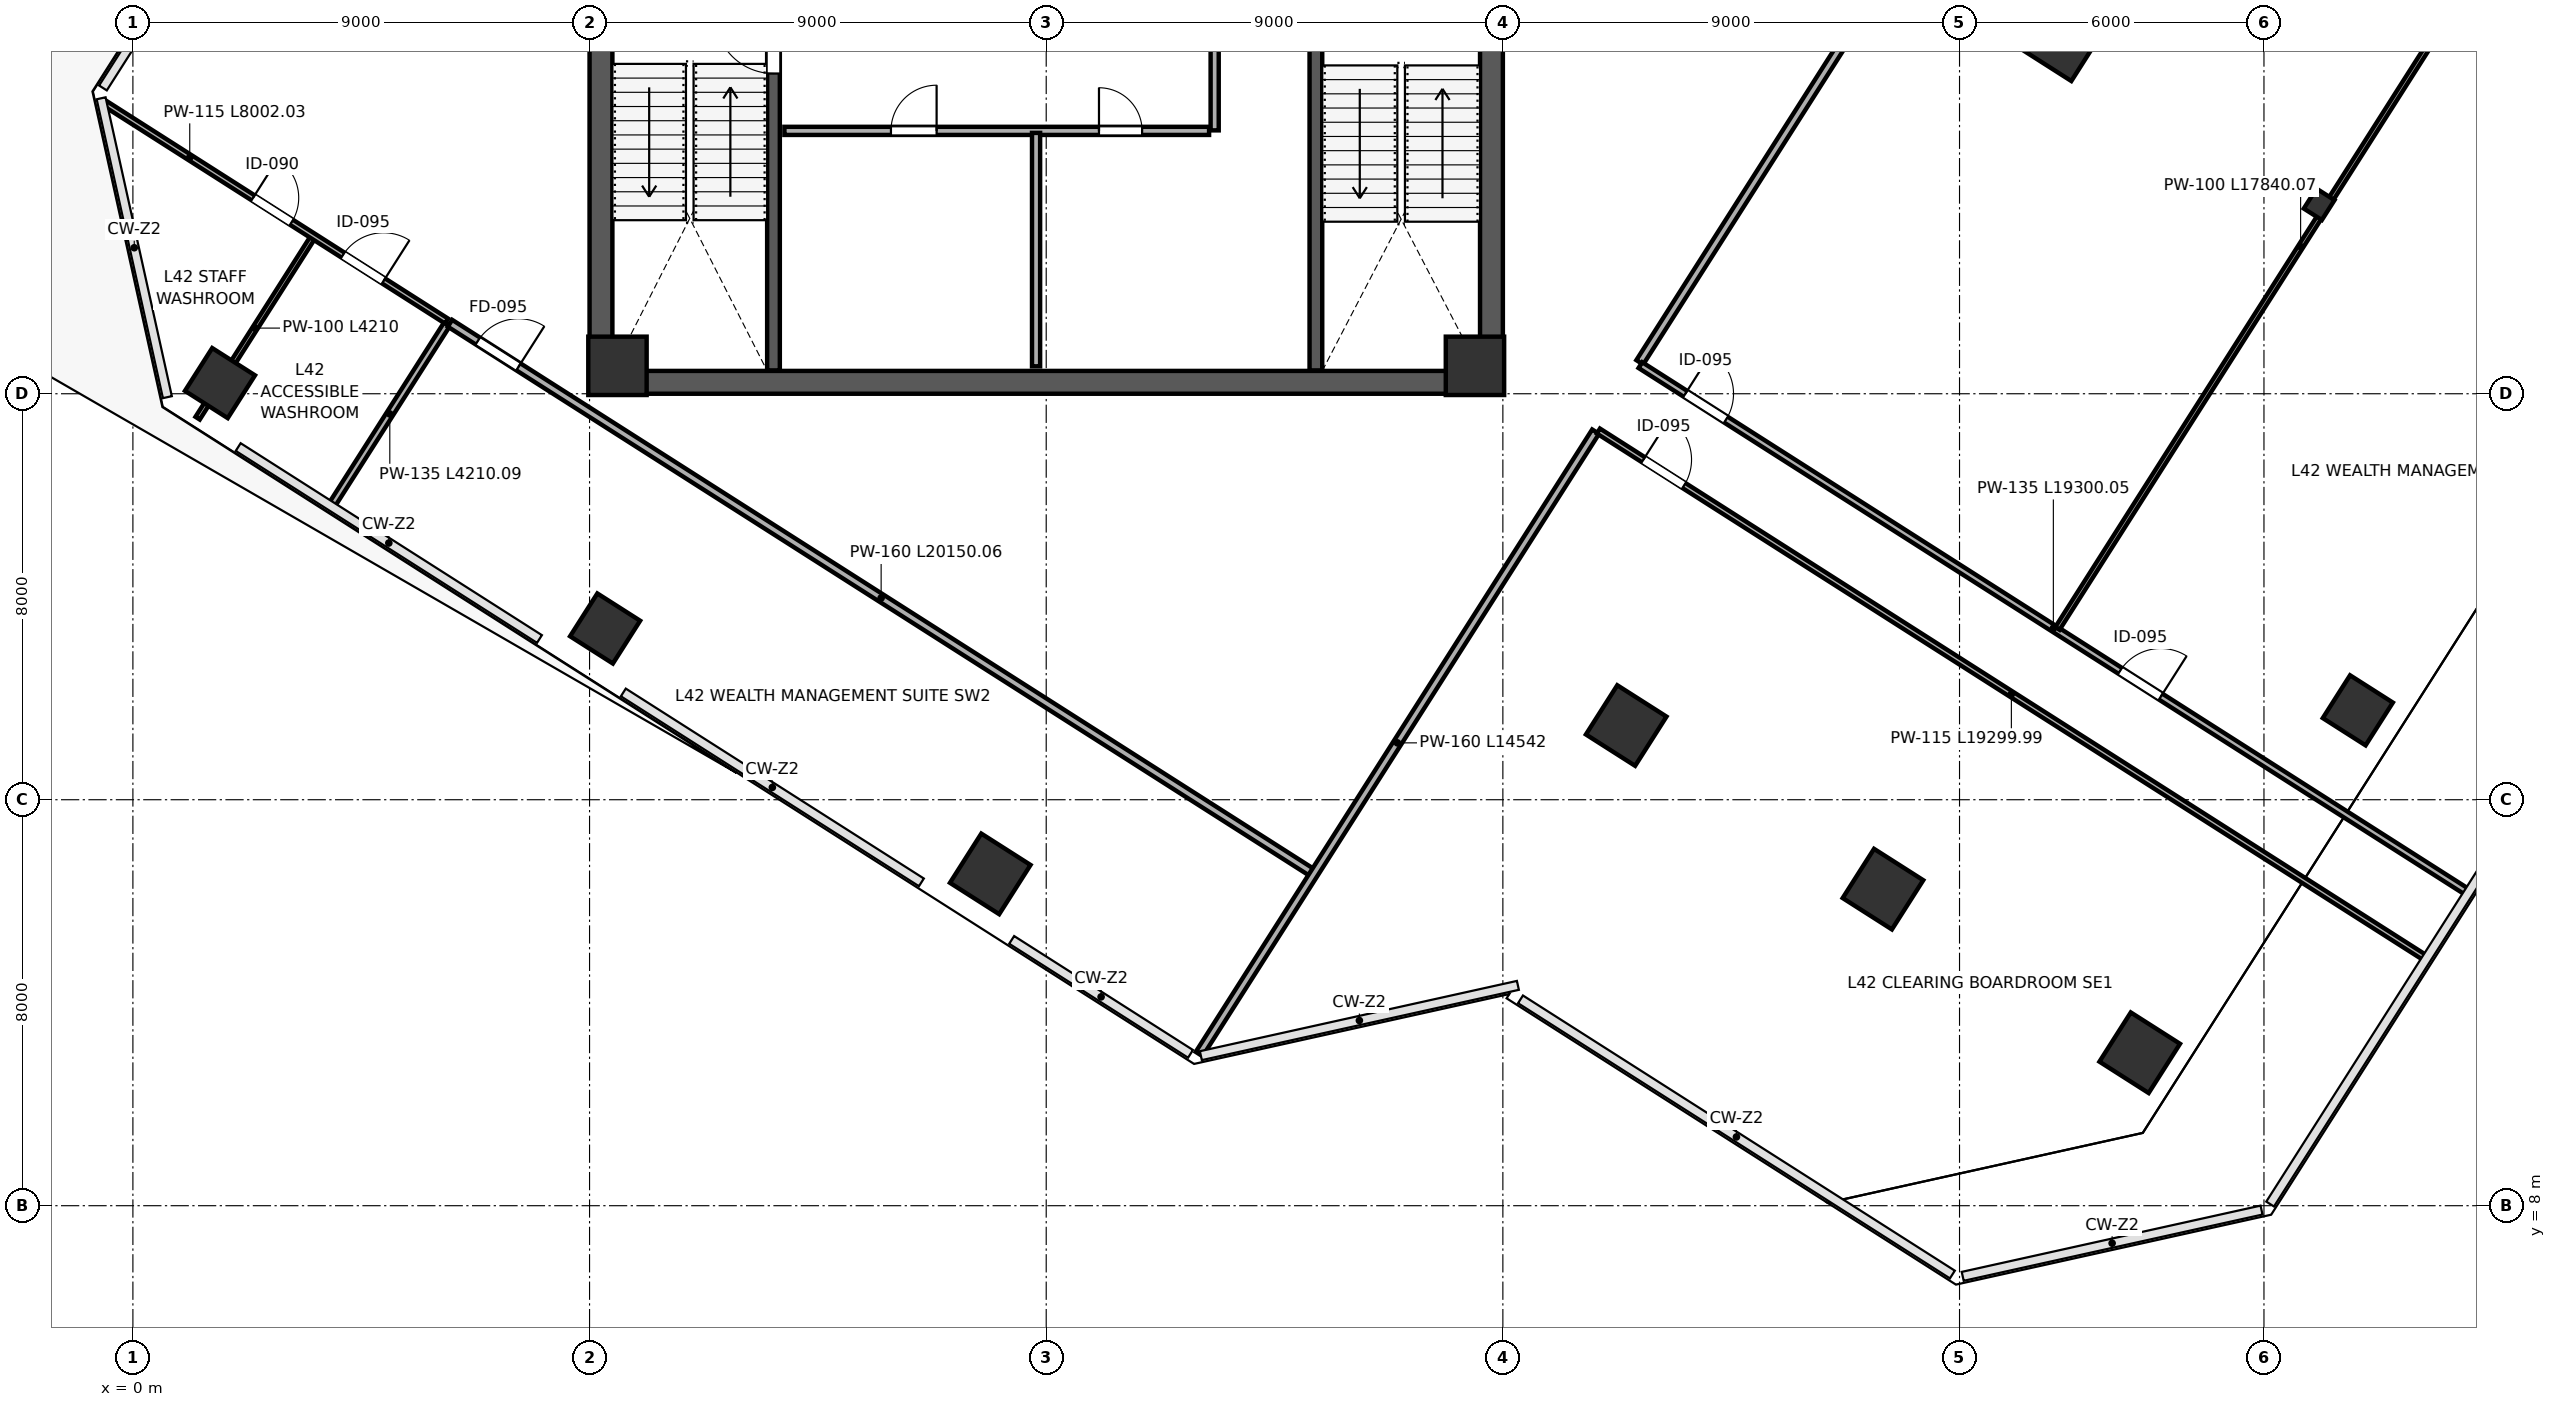
"""IFC4 building model, lengths in metres.
Left out: names, types, materials, properties, quantities, classifications, styles, units other than length and angle.
Written with IfcOpenShell. Run it as: python <this file> out.ifc"""

import sys

from ifc_helpers import new_model, si_unit, direction, frame, frame_2d, origin, origin_2d, place, context, subcontext, project, spatial, rectangle, i_section, extrude, source, transform, mapped, element, fill, save


model = new_model("IFC4")
c1 = context("Model", 3, precision=1e-05, world=origin(), true_north=direction((0.0, 1.0)))
c2 = subcontext(c1, "Body", "Model", "MODEL_VIEW")
j1 = project(units=[si_unit("LENGTHUNIT", "METRE"), si_unit("PLANEANGLEUNIT", "RADIAN")], contexts=[c1])
p1 = place(None, origin())
s1 = spatial("IfcSite", under=j1, at=p1, CompositionType="ELEMENT")
p2 = place(p1, origin())
s2 = spatial("IfcBuilding", under=s1, at=p2, CompositionType="ELEMENT")
p3 = place(p2, frame((0.0, 0.0, 187.6)))
s3 = spatial("IfcBuildingStorey", under=s2, at=p3, CompositionType="ELEMENT", Elevation=187.6)
m1 = source(origin(), c2, "Body", "SweptSolid", [
    extrude(rectangle(XDim=1.15, YDim=1.15, at=origin_2d()), origin(), (0.0, 0.0, 1.0), 4.198),
])
for number, where, z_axis, x_axis in (
    (1, (9.55, 24.55, 0.001), (0.0, 0.0, 1.0), (1.0, 0.0, 0.0)),
    (2, (26.45, 24.55, 0.001), (0.0, 0.0, 1.0), (1.0, 0.0, 0.0)),
):
    element("IfcColumn", number, at=place(p3, frame(where, z_axis=z_axis, x_axis=x_axis)), inside=s3, PredefinedType="COLUMN", context=c2, shape_type="MappedRepresentation", body=[
        mapped(m1, transform((0.0, 0.0, 0.0), scale=1.0)),
    ])
m2 = source(origin(), c2, "Body", "SweptSolid", [
    extrude(rectangle(XDim=1.0, YDim=1.0, at=origin_2d()), origin(), (0.0, 0.0, 1.0), 4.198),
])
for number, where, z_axis, x_axis in (
    (3, (1.716, 24.21, 0.001), (0.0, 0.0, 1.0), (-0.843, 0.537, 0.0)),
    (4, (9.307, 19.374, 0.001), (0.0, 0.0, 1.0), (-0.843, 0.537, 0.0)),
):
    element("IfcColumn", number, at=place(p3, frame(where, z_axis=z_axis, x_axis=x_axis)), inside=s3, PredefinedType="COLUMN", context=c2, shape_type="MappedRepresentation", body=[
        mapped(m2, transform((0.0, 0.0, 0.0), scale=1.0)),
    ])
m3 = source(origin(), c2, "Body", "SweptSolid", [
    extrude(rectangle(XDim=1.15, YDim=1.15, at=origin_2d()), origin(), (0.0, 0.0, 1.0), 4.198),
])
p4 = place(p3, frame((16.897, 14.539, 0.001), z_axis=(0.0, 0.0, 1.0), x_axis=(-0.843391445813, 0.537299608347, 0.0)))
e5 = element("IfcColumn", 5, at=p4, inside=s3, PredefinedType="COLUMN", context=c2, shape_type="MappedRepresentation", body=[
    mapped(m3, transform((0.0, 0.0, 0.0), scale=1.0)),
])
for number, where, z_axis, x_axis in (
    (6, (29.431, 17.462, 0.001), (0.0, 0.0, 1.0), (-0.843, 0.537, 0.0)),
    (7, (38.028, 30.956, 0.001), (0.0, 0.0, 1.0), (-0.843, 0.537, 0.0)),
    (8, (34.491, 14.238, 0.001), (0.0, 0.0, 1.0), (-0.843, 0.537, 0.0)),
):
    element("IfcColumn", number, at=place(p3, frame(where, z_axis=z_axis, x_axis=x_axis)), inside=s3, PredefinedType="COLUMN", context=c2, shape_type="MappedRepresentation", body=[
        mapped(m1, transform((0.0, 0.0, 0.0), scale=1.0)),
    ])
m4 = source(origin(), c2, "Body", "SweptSolid", [
    extrude(i_section(OverallWidth=0.421, OverallDepth=0.465, WebThickness=0.045, FlangeThickness=0.072, FilletRadius=0.015, at=origin_2d()), origin(), (0.0, 0.0, 1.0), 4.198),
])
p5 = place(p3, frame((43.088, 27.732, 0.001), z_axis=(0.0, 0.0, 1.0), x_axis=(-0.843391445813, 0.537299608347, 0.0)))
e9 = element("IfcColumn", 9, at=p5, inside=s3, PredefinedType="COLUMN", context=c2, shape_type="MappedRepresentation", body=[
    mapped(m4, transform((0.0, 0.0, 0.0), scale=1.0)),
])
p6 = place(p3, frame((39.552, 11.014, 0.001), z_axis=(0.0, 0.0, 1.0), x_axis=(-0.843391445813, 0.537299608347, 0.0)))
e10 = element("IfcColumn", 10, at=p6, inside=s3, PredefinedType="COLUMN", context=c2, shape_type="MappedRepresentation", body=[
    mapped(m3, transform((0.0, 0.0, 0.0), scale=1.0)),
])
p7 = place(p3, frame((43.85, 17.762, 0.001), z_axis=(0.0, 0.0, 1.0), x_axis=(-0.843391445813, 0.537299608347, 0.0)))
e11 = element("IfcColumn", 11, at=p7, inside=s3, PredefinedType="COLUMN", context=c2, shape_type="MappedRepresentation", body=[
    mapped(m2, transform((0.0, 0.0, 0.0), scale=1.0)),
])
p8 = place(p3, frame((9.225, 24.45, 0.0), z_axis=(0.0, 0.0, 1.0), x_axis=(0.0, 1.0, 0.0)))
e12 = element("IfcWall", 12, at=p8, inside=s3, PredefinedType="SHEAR", context=c2, shape_type="SweptSolid", body=[
    extrude(rectangle(XDim=15.1, YDim=0.45, at=frame_2d((7.55, 0.0))), origin(), (0.0, 0.0, 1.0), 3.96),
])
p9 = place(p3, frame((26.775, 24.45, 0.0), z_axis=(0.0, 0.0, 1.0), x_axis=(0.0, 1.0, 0.0)))
e13 = element("IfcWall", 13, at=p9, inside=s3, PredefinedType="SHEAR", context=c2, shape_type="SweptSolid", body=[
    extrude(rectangle(XDim=15.1, YDim=0.45, at=frame_2d((7.55, 0.0))), origin(), (0.0, 0.0, 1.0), 3.96),
])
p10 = place(p9, frame((8.6, 0.0, 0.0)))
e14 = element("IfcOpeningElement", 14, at=p10, cuts=e13, PredefinedType="OPENING", context=c2, shape_type="SweptSolid", body=[
    extrude(rectangle(XDim=1.15, YDim=2.2, at=frame_2d((0.575, 1.1))), frame((0.0, 0.235, 0.0), z_axis=(0.0, -1.0, 0.0), x_axis=(1.0, 0.0, 0.0)), (0.0, 0.0, 1.0), 0.47),
])
p11 = place(p3, frame((9.0, 24.225, 0.0), z_axis=(0.0, 0.0, 1.0), x_axis=(1.0, 0.0, 0.0)))
e15 = element("IfcWall", 15, at=p11, inside=s3, PredefinedType="SHEAR", context=c2, shape_type="SweptSolid", body=[
    extrude(rectangle(XDim=18.0, YDim=0.45, at=frame_2d((9.0, 0.0))), origin(), (0.0, 0.0, 1.0), 3.96),
])
p12 = place(p3, frame((12.625, 24.46, 0.0), z_axis=(0.0, 0.0, 1.0), x_axis=(0.0, 1.0, 0.0)))
e16 = element("IfcWall", 16, at=p12, inside=s3, PredefinedType="SHEAR", context=c2, shape_type="SweptSolid", body=[
    extrude(rectangle(XDim=7.49, YDim=0.25, at=frame_2d((3.745, 0.0))), origin(), (0.0, 0.0, 1.0), 3.96),
])
p13 = place(p12, frame((5.85, 0.0, 0.0)))
e17 = element("IfcOpeningElement", 17, at=p13, cuts=e16, PredefinedType="OPENING", context=c2, shape_type="SweptSolid", body=[
    extrude(rectangle(XDim=1.15, YDim=2.2, at=frame_2d((0.575, 1.1))), frame((0.0, 0.135, 0.0), z_axis=(0.0, -1.0, 0.0), x_axis=(1.0, 0.0, 0.0)), (0.0, 0.0, 1.0), 0.27),
])
p14 = place(p3, frame((23.315, 24.46, 0.0), z_axis=(0.0, 0.0, 1.0), x_axis=(0.0, 1.0, 0.0)))
e18 = element("IfcWall", 18, at=p14, inside=s3, PredefinedType="SHEAR", context=c2, shape_type="SweptSolid", body=[
    extrude(rectangle(XDim=7.49, YDim=0.25, at=frame_2d((3.745, 0.0))), origin(), (0.0, 0.0, 1.0), 3.96),
])
p15 = place(p3, frame((12.84, 29.18, 0.0), z_axis=(0.0, 0.0, 1.0), x_axis=(1.0, 0.0, 0.0)))
e19 = element("IfcWall", 19, at=p15, inside=s3, PredefinedType="PARTITIONING", context=c2, shape_type="SweptSolid", body=[
    extrude(rectangle(XDim=8.37, YDim=0.16, at=frame_2d((4.185, 0.0))), origin(), (0.0, 0.0, 1.0), 3.96),
])
p16 = place(p15, frame((2.1, 0.0, 0.0)))
e20 = element("IfcOpeningElement", 20, at=p16, cuts=e19, PredefinedType="OPENING", context=c2, shape_type="SweptSolid", body=[
    extrude(rectangle(XDim=0.9, YDim=2.15, at=frame_2d((0.45, 1.075))), frame((0.0, 0.09, 0.0), z_axis=(0.0, -1.0, 0.0), x_axis=(1.0, 0.0, 0.0)), (0.0, 0.0, 1.0), 0.18),
])
p17 = place(p15, frame((6.2, 0.0, 0.0)))
e21 = element("IfcOpeningElement", 21, at=p17, cuts=e19, PredefinedType="OPENING", context=c2, shape_type="SweptSolid", body=[
    extrude(rectangle(XDim=0.85, YDim=2.1, at=frame_2d((0.425, 1.05))), frame((0.0, 0.09, 0.0), z_axis=(0.0, -1.0, 0.0), x_axis=(1.0, 0.0, 0.0)), (0.0, 0.0, 1.0), 0.18),
])
p18 = place(p3, frame((17.8, 24.54, 0.0), z_axis=(0.0, 0.0, 1.0), x_axis=(0.0, 1.0, 0.0)))
e22 = element("IfcWall", 22, at=p18, inside=s3, PredefinedType="PARTITIONING", context=c2, shape_type="SweptSolid", body=[
    extrude(rectangle(XDim=4.6, YDim=0.16, at=frame_2d((2.3, 0.0))), origin(), (0.0, 0.0, 1.0), 3.96),
])
p19 = place(p3, frame((21.32, 29.19, 0.0), z_axis=(0.0, 0.0, 1.0), x_axis=(0.0, 1.0, 0.0)))
e23 = element("IfcWall", 23, at=p19, inside=s3, PredefinedType="PARTITIONING", context=c2, shape_type="SweptSolid", body=[
    extrude(rectangle(XDim=2.92, YDim=0.16, at=frame_2d((1.46, 0.0))), origin(), (0.0, 0.0, 1.0), 3.96),
])
p20 = place(p3, frame((1.275, 23.518, 0.0), z_axis=(0.0, 0.0, 1.0), x_axis=(0.537318174822, 0.843379617376, 0.0)))
e24 = element("IfcWall", 24, at=p20, inside=s3, PredefinedType="PARTITIONING", context=c2, shape_type="SweptSolid", body=[
    extrude(rectangle(XDim=4.21, YDim=0.1, at=frame_2d((2.105, 0.0))), origin(), (0.0, 0.0, 1.0), 3.195),
])
p21 = place(p3, frame((3.932, 21.826, 0.0), z_axis=(0.0, 0.0, 1.0), x_axis=(0.537250649862, 0.84342263381, 0.0)))
e25 = element("IfcWall", 25, at=p21, inside=s3, PredefinedType="PARTITIONING", context=c2, shape_type="SweptSolid", body=[
    extrude(rectangle(XDim=4.21, YDim=0.135, at=frame_2d((2.105, 0.0))), origin(), (0.0, 0.0, 1.0), 3.195),
])
p22 = place(p3, frame((-0.567, 29.731, 0.0), z_axis=(0.0, 0.0, 1.0), x_axis=(0.843398817975, -0.537288036195, 0.0)))
e26 = element("IfcWall", 26, at=p22, inside=s3, PredefinedType="PARTITIONING", context=c2, shape_type="SweptSolid", body=[
    extrude(rectangle(XDim=8.002, YDim=0.115, at=frame_2d((4.001, 0.0))), origin(), (0.0, 0.0, 1.0), 3.96),
])
p23 = place(p22, frame((3.48, 0.0, 0.0)))
e27 = element("IfcOpeningElement", 27, at=p23, cuts=e26, PredefinedType="OPENING", context=c2, shape_type="SweptSolid", body=[
    extrude(rectangle(XDim=0.9, YDim=2.15, at=frame_2d((0.45, 1.075))), frame((0.0, 0.067, 0.0), z_axis=(0.0, -1.0, 0.0), x_axis=(1.0, 0.0, 0.0)), (0.0, 0.0, 1.0), 0.135),
])
p24 = place(p22, frame((5.58, 0.0, 0.0)))
e28 = element("IfcOpeningElement", 28, at=p24, cuts=e26, PredefinedType="OPENING", context=c2, shape_type="SweptSolid", body=[
    extrude(rectangle(XDim=0.95, YDim=2.15, at=frame_2d((0.475, 1.075))), frame((0.0, 0.067, 0.0), z_axis=(0.0, -1.0, 0.0), x_axis=(1.0, 0.0, 0.0)), (0.0, 0.0, 1.0), 0.135),
])
p25 = place(p3, frame((6.25, 25.389, 0.0), z_axis=(0.0, 0.0, 1.0), x_axis=(0.843390478307, -0.537301127024, 0.0)))
e29 = element("IfcWall", 29, at=p25, inside=s3, PredefinedType="PARTITIONING", context=c2, shape_type="SweptSolid", body=[
    extrude(rectangle(XDim=20.15, YDim=0.16, at=frame_2d((10.075, 0.0))), origin(), (0.0, 0.0, 1.0), 3.96),
])
p26 = place(p25, frame((0.65, 0.0, 0.0)))
e30 = element("IfcOpeningElement", 30, at=p26, cuts=e29, PredefinedType="OPENING", context=c2, shape_type="SweptSolid", body=[
    extrude(rectangle(XDim=0.95, YDim=2.15, at=frame_2d((0.475, 1.075))), frame((0.0, 0.09, 0.0), z_axis=(0.0, -1.0, 0.0), x_axis=(1.0, 0.0, 0.0)), (0.0, 0.0, 1.0), 0.18),
])
p27 = place(p3, frame((29.698, 24.619, 0.0), z_axis=(0.0, 0.0, 1.0), x_axis=(0.537299578138, 0.843391465058, 0.0)))
e31 = element("IfcWall", 31, at=p27, inside=s3, PredefinedType="PARTITIONING", context=c2, shape_type="SweptSolid", body=[
    extrude(rectangle(XDim=17.84, YDim=0.16, at=frame_2d((8.92, 0.0))), origin(), (0.0, 0.0, 1.0), 3.195),
])
p28 = place(p3, frame((21.014, 10.988, 0.0), z_axis=(0.0, 0.0, 1.0), x_axis=(0.537301260837, 0.843390393058, 0.0)))
e32 = element("IfcWall", 32, at=p28, inside=s3, PredefinedType="PARTITIONING", context=c2, shape_type="SweptSolid", body=[
    extrude(rectangle(XDim=14.542, YDim=0.16, at=frame_2d((7.271, 0.0))), origin(), (0.0, 0.0, 1.0), 3.96),
])
p29 = place(p3, frame((29.71, 24.564, 0.0), z_axis=(0.0, 0.0, 1.0), x_axis=(0.843390003721, -0.537301871971, 0.0)))
e33 = element("IfcWall", 33, at=p29, inside=s3, PredefinedType="PARTITIONING", context=c2, shape_type="SweptSolid", body=[
    extrude(rectangle(XDim=19.3, YDim=0.135, at=frame_2d((9.65, 0.0))), origin(), (0.0, 0.0, 1.0), 3.252),
])
p30 = place(p29, frame((1.05, 0.0, 0.0)))
e34 = element("IfcOpeningElement", 34, at=p30, cuts=e33, PredefinedType="OPENING", context=c2, shape_type="SweptSolid", body=[
    extrude(rectangle(XDim=0.95, YDim=2.15, at=frame_2d((0.475, 1.075))), frame((0.0, 0.078, 0.0), z_axis=(0.0, -1.0, 0.0), x_axis=(1.0, 0.0, 0.0)), (0.0, 0.0, 1.0), 0.155),
])
p31 = place(p29, frame((11.21, 0.0, 0.0)))
e35 = element("IfcOpeningElement", 35, at=p31, cuts=e33, PredefinedType="OPENING", context=c2, shape_type="SweptSolid", body=[
    extrude(rectangle(XDim=0.95, YDim=2.15, at=frame_2d((0.475, 1.075))), frame((0.0, 0.078, 0.0), z_axis=(0.0, -1.0, 0.0), x_axis=(1.0, 0.0, 0.0)), (0.0, 0.0, 1.0), 0.155),
])
p32 = place(p3, frame((28.883, 23.265, 0.0), z_axis=(0.0, 0.0, 1.0), x_axis=(0.843390003721, -0.537301871971, 0.0)))
e36 = element("IfcWall", 36, at=p32, inside=s3, PredefinedType="PARTITIONING", context=c2, shape_type="SweptSolid", body=[
    extrude(rectangle(XDim=19.3, YDim=0.115, at=frame_2d((9.65, 0.0))), origin(), (0.0, 0.0, 1.0), 3.252),
])
p33 = place(p32, frame((1.05, 0.0, 0.0)))
e37 = element("IfcOpeningElement", 37, at=p33, cuts=e36, PredefinedType="OPENING", context=c2, shape_type="SweptSolid", body=[
    extrude(rectangle(XDim=0.95, YDim=2.15, at=frame_2d((0.475, 1.075))), frame((0.0, 0.067, 0.0), z_axis=(0.0, -1.0, 0.0), x_axis=(1.0, 0.0, 0.0)), (0.0, 0.0, 1.0), 0.135),
])
p34 = place(p3, frame((37.93, 19.375, 0.0), z_axis=(0.0, 0.0, 1.0), x_axis=(0.537293376795, 0.843395415717, 0.0)))
e38 = element("IfcWall", 38, at=p34, inside=s3, PredefinedType="PARTITIONING", context=c2, shape_type="SweptSolid", body=[
    extrude(rectangle(XDim=17.84, YDim=0.1, at=frame_2d((8.92, 0.0))), origin(), (0.0, 0.0, 1.0), 3.96),
])
m5 = source(origin(), c2, "Body", "SweptSolid", [
    extrude(rectangle(XDim=1.15, YDim=2.2, at=frame_2d((0.575, 1.1))), frame((0.0, 0.025, 0.0), z_axis=(0.0, -1.0, 0.0), x_axis=(1.0, 0.0, 0.0)), (0.0, 0.0, 1.0), 0.05),
])
p35 = place(p13, origin())
e39 = element("IfcDoor", 39, at=p35, inside=s3, OperationType="SINGLE_SWING_RIGHT", PredefinedType="DOOR", context=c2, shape_type="MappedRepresentation", body=[
    mapped(m5, transform((0.0, 0.0, 0.0), scale=1.0)),
])
fill(e17, e39)
m6 = source(origin(), c2, "Body", "SweptSolid", [
    extrude(rectangle(XDim=0.9, YDim=2.15, at=frame_2d((0.45, 1.075))), frame((0.0, 0.025, 0.0), z_axis=(0.0, -1.0, 0.0), x_axis=(1.0, 0.0, 0.0)), (0.0, 0.0, 1.0), 0.05),
])
p36 = place(p16, origin())
e40 = element("IfcDoor", 40, at=p36, inside=s3, OperationType="SINGLE_SWING_RIGHT", PredefinedType="DOOR", context=c2, shape_type="MappedRepresentation", body=[
    mapped(m6, transform((0.0, 0.0, 0.0), scale=1.0)),
])
fill(e20, e40)
m7 = source(origin(), c2, "Body", "SweptSolid", [
    extrude(rectangle(XDim=0.85, YDim=2.1, at=frame_2d((0.425, 1.05))), frame((0.0, 0.025, 0.0), z_axis=(0.0, -1.0, 0.0), x_axis=(1.0, 0.0, 0.0)), (0.0, 0.0, 1.0), 0.05),
])
p37 = place(p17, origin())
e41 = element("IfcDoor", 41, at=p37, inside=s3, OperationType="SINGLE_SWING_LEFT", PredefinedType="DOOR", context=c2, shape_type="MappedRepresentation", body=[
    mapped(m7, transform((0.0, 0.0, 0.0), scale=1.0)),
])
fill(e21, e41)
m8 = source(origin(), c2, "Body", "SweptSolid", [
    extrude(rectangle(XDim=0.9, YDim=2.15, at=frame_2d((0.45, 1.075))), frame((0.0, 0.025, 0.0), z_axis=(0.0, -1.0, 0.0), x_axis=(1.0, 0.0, 0.0)), (0.0, 0.0, 1.0), 0.05),
])
p38 = place(p23, origin())
e42 = element("IfcDoor", 42, at=p38, inside=s3, OperationType="SINGLE_SWING_LEFT", PredefinedType="DOOR", context=c2, shape_type="MappedRepresentation", body=[
    mapped(m8, transform((0.0, 0.0, 0.0), scale=1.0)),
])
fill(e27, e42)
m9 = source(origin(), c2, "Body", "SweptSolid", [
    extrude(rectangle(XDim=0.95, YDim=2.15, at=frame_2d((0.475, 1.075))), frame((0.0, 0.025, 0.0), z_axis=(0.0, -1.0, 0.0), x_axis=(1.0, 0.0, 0.0)), (0.0, 0.0, 1.0), 0.05),
])
p39 = place(p24, origin())
e43 = element("IfcDoor", 43, at=p39, inside=s3, OperationType="SINGLE_SWING_RIGHT", PredefinedType="DOOR", context=c2, shape_type="MappedRepresentation", body=[
    mapped(m9, transform((0.0, 0.0, 0.0), scale=1.0)),
])
fill(e28, e43)
m10 = source(origin(), c2, "Body", "SweptSolid", [
    extrude(rectangle(XDim=0.95, YDim=2.15, at=frame_2d((0.475, 1.075))), frame((0.0, 0.025, 0.0), z_axis=(0.0, -1.0, 0.0), x_axis=(1.0, 0.0, 0.0)), (0.0, 0.0, 1.0), 0.05),
])
p40 = place(p26, origin())
e44 = element("IfcDoor", 44, at=p40, inside=s3, OperationType="SINGLE_SWING_RIGHT", PredefinedType="DOOR", context=c2, shape_type="MappedRepresentation", body=[
    mapped(m10, transform((0.0, 0.0, 0.0), scale=1.0)),
])
fill(e30, e44)
p41 = place(p30, origin())
e45 = element("IfcDoor", 45, at=p41, inside=s3, OperationType="SINGLE_SWING_LEFT", PredefinedType="DOOR", context=c2, shape_type="MappedRepresentation", body=[
    mapped(m9, transform((0.0, 0.0, 0.0), scale=1.0)),
])
fill(e34, e45)
p42 = place(p31, origin())
e46 = element("IfcDoor", 46, at=p42, inside=s3, OperationType="SINGLE_SWING_RIGHT", PredefinedType="DOOR", context=c2, shape_type="MappedRepresentation", body=[
    mapped(m9, transform((0.0, 0.0, 0.0), scale=1.0)),
])
fill(e35, e46)
p43 = place(p33, origin())
e47 = element("IfcDoor", 47, at=p43, inside=s3, OperationType="SINGLE_SWING_LEFT", PredefinedType="DOOR", context=c2, shape_type="MappedRepresentation", body=[
    mapped(m9, transform((0.0, 0.0, 0.0), scale=1.0)),
])
fill(e37, e47)
save(model, sys.argv[1])
